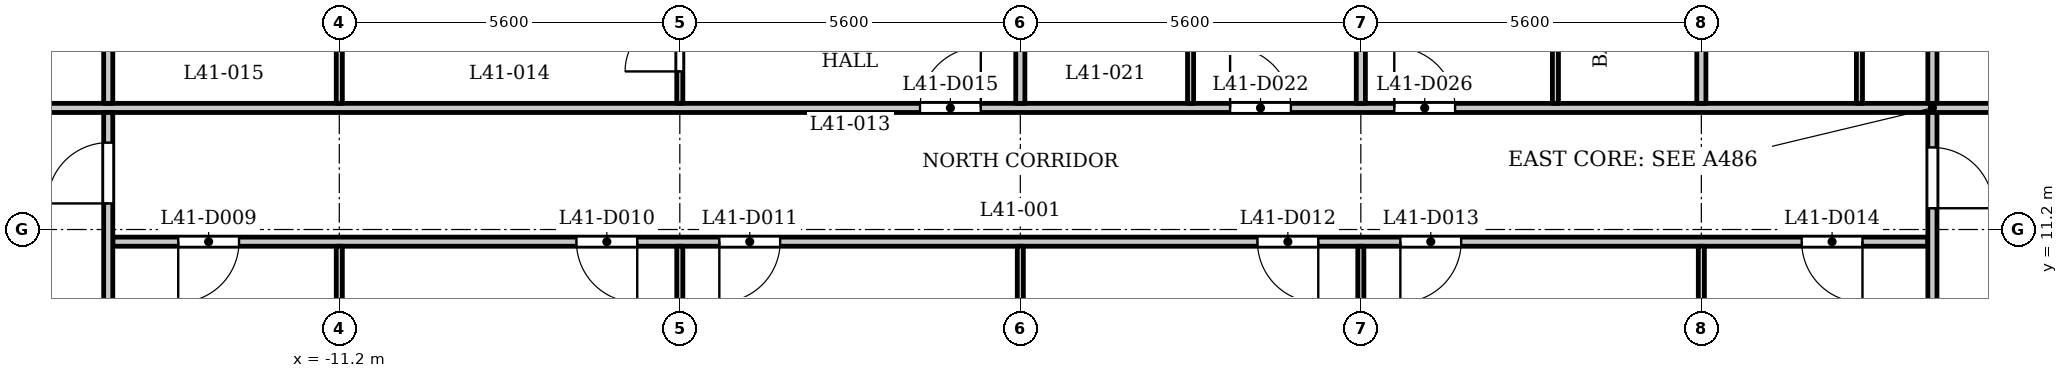
"""IFC4 building model, lengths in metres.
Left out: names, types, materials, properties, quantities, classifications, styles, units other than length and angle.
Written with IfcOpenShell. Run it as: python <this file> out.ifc"""

import sys

from ifc_helpers import new_model, si_unit, direction, frame, frame_2d, origin, place, context, subcontext, project, spatial, rectangle, extrude, element, fill, save


model = new_model("IFC4")
c1 = context("Model", 3, precision=1e-05, world=origin(), true_north=direction((0.0, 1.0)))
c2 = subcontext(c1, "Body", "Model", "MODEL_VIEW")
j1 = project(units=[si_unit("LENGTHUNIT", "METRE"), si_unit("PLANEANGLEUNIT", "RADIAN")], contexts=[c1])
p1 = place(None, origin())
s1 = spatial("IfcSite", under=j1, at=p1, CompositionType="ELEMENT")
p2 = place(p1, origin())
s2 = spatial("IfcBuilding", under=s1, at=p2, CompositionType="ELEMENT")
p3 = place(p2, frame((0.0, 0.0, 160.6)))
s3 = spatial("IfcBuildingStorey", under=s2, at=p3, CompositionType="ELEMENT", Elevation=160.6)
p4 = place(p3, frame((-14.925, 11.0, 0.0), z_axis=(0.0, 0.0, 1.0), x_axis=(1.0, 0.0, 0.0)))
e1 = element("IfcWall", 1, at=p4, inside=s3, PredefinedType="PARTITIONING", context=c2, shape_type="SweptSolid", body=[
    extrude(rectangle(XDim=29.85, YDim=0.15, at=frame_2d((14.925, 0.0))), origin(), (0.0, 0.0, 1.0), 3.2),
])
p5 = place(p4, frame((1.076, 0.0, 0.0)))
e2 = element("IfcOpeningElement", 2, at=p5, cuts=e1, PredefinedType="OPENING", context=c2, shape_type="SweptSolid", body=[
    extrude(rectangle(XDim=1.0, YDim=2.1, at=frame_2d((0.5, 1.05))), frame((0.0, 0.085, 0.0), z_axis=(0.0, -1.0, 0.0), x_axis=(1.0, 0.0, 0.0)), (0.0, 0.0, 1.0), 0.17),
])
p6 = place(p4, frame((7.625, 0.0, 0.0)))
e3 = element("IfcOpeningElement", 3, at=p6, cuts=e1, PredefinedType="OPENING", context=c2, shape_type="SweptSolid", body=[
    extrude(rectangle(XDim=1.0, YDim=2.1, at=frame_2d((0.5, 1.05))), frame((0.0, 0.085, 0.0), z_axis=(0.0, -1.0, 0.0), x_axis=(1.0, 0.0, 0.0)), (0.0, 0.0, 1.0), 0.17),
])
p7 = place(p4, frame((9.975, 0.0, 0.0)))
e4 = element("IfcOpeningElement", 4, at=p7, cuts=e1, PredefinedType="OPENING", context=c2, shape_type="SweptSolid", body=[
    extrude(rectangle(XDim=1.0, YDim=2.1, at=frame_2d((0.5, 1.05))), frame((0.0, 0.085, 0.0), z_axis=(0.0, -1.0, 0.0), x_axis=(1.0, 0.0, 0.0)), (0.0, 0.0, 1.0), 0.17),
])
p8 = place(p4, frame((18.825, 0.0, 0.0)))
e5 = element("IfcOpeningElement", 5, at=p8, cuts=e1, PredefinedType="OPENING", context=c2, shape_type="SweptSolid", body=[
    extrude(rectangle(XDim=1.0, YDim=2.1, at=frame_2d((0.5, 1.05))), frame((0.0, 0.085, 0.0), z_axis=(0.0, -1.0, 0.0), x_axis=(1.0, 0.0, 0.0)), (0.0, 0.0, 1.0), 0.17),
])
p9 = place(p4, frame((21.175, 0.0, 0.0)))
e6 = element("IfcOpeningElement", 6, at=p9, cuts=e1, PredefinedType="OPENING", context=c2, shape_type="SweptSolid", body=[
    extrude(rectangle(XDim=1.0, YDim=2.1, at=frame_2d((0.5, 1.05))), frame((0.0, 0.085, 0.0), z_axis=(0.0, -1.0, 0.0), x_axis=(1.0, 0.0, 0.0)), (0.0, 0.0, 1.0), 0.17),
])
p10 = place(p4, frame((27.775, 0.0, 0.0)))
e7 = element("IfcOpeningElement", 7, at=p10, cuts=e1, PredefinedType="OPENING", context=c2, shape_type="SweptSolid", body=[
    extrude(rectangle(XDim=1.0, YDim=2.1, at=frame_2d((0.5, 1.05))), frame((0.0, 0.085, 0.0), z_axis=(0.0, -1.0, 0.0), x_axis=(1.0, 0.0, 0.0)), (0.0, 0.0, 1.0), 0.17),
])
p11 = place(p3, frame((-17.4, 13.2, 0.0), z_axis=(0.0, 0.0, 1.0), x_axis=(1.0, 0.0, 0.0)))
e8 = element("IfcWall", 8, at=p11, inside=s3, PredefinedType="PARTITIONING", context=c2, shape_type="SweptSolid", body=[
    extrude(rectangle(XDim=34.8, YDim=0.15, at=frame_2d((17.4, 0.0))), origin(), (0.0, 0.0, 1.0), 3.2),
])
p12 = place(p11, frame((0.25, 0.0, 0.0)))
e9 = element("IfcOpeningElement", 9, at=p12, cuts=e8, PredefinedType="OPENING", context=c2, shape_type="SweptSolid", body=[
    extrude(rectangle(XDim=1.0, YDim=2.1, at=frame_2d((0.5, 1.05))), frame((0.0, 0.085, 0.0), z_axis=(0.0, -1.0, 0.0), x_axis=(1.0, 0.0, 0.0)), (0.0, 0.0, 1.0), 0.17),
])
p13 = place(p11, frame((33.65, 0.0, 0.0)))
e10 = element("IfcOpeningElement", 10, at=p13, cuts=e8, PredefinedType="OPENING", context=c2, shape_type="SweptSolid", body=[
    extrude(rectangle(XDim=1.0, YDim=2.1, at=frame_2d((0.5, 1.05))), frame((0.0, 0.085, 0.0), z_axis=(0.0, -1.0, 0.0), x_axis=(1.0, 0.0, 0.0)), (0.0, 0.0, 1.0), 0.17),
])
p14 = place(p11, frame((15.75, 0.0, 0.0)))
e11 = element("IfcOpeningElement", 11, at=p14, cuts=e8, PredefinedType="OPENING", context=c2, shape_type="SweptSolid", body=[
    extrude(rectangle(XDim=1.0, YDim=2.1, at=frame_2d((0.5, 1.05))), frame((0.0, 0.085, 0.0), z_axis=(0.0, -1.0, 0.0), x_axis=(1.0, 0.0, 0.0)), (0.0, 0.0, 1.0), 0.17),
])
p15 = place(p11, frame((20.85, 0.0, 0.0)))
e12 = element("IfcOpeningElement", 12, at=p15, cuts=e8, PredefinedType="OPENING", context=c2, shape_type="SweptSolid", body=[
    extrude(rectangle(XDim=1.0, YDim=2.1, at=frame_2d((0.5, 1.05))), frame((0.0, 0.085, 0.0), z_axis=(0.0, -1.0, 0.0), x_axis=(1.0, 0.0, 0.0)), (0.0, 0.0, 1.0), 0.17),
])
p16 = place(p11, frame((23.55, 0.0, 0.0)))
e13 = element("IfcOpeningElement", 13, at=p16, cuts=e8, PredefinedType="OPENING", context=c2, shape_type="SweptSolid", body=[
    extrude(rectangle(XDim=1.0, YDim=2.1, at=frame_2d((0.5, 1.05))), frame((0.0, 0.085, 0.0), z_axis=(0.0, -1.0, 0.0), x_axis=(1.0, 0.0, 0.0)), (0.0, 0.0, 1.0), 0.17),
])
p17 = place(p3, frame((-15.0, 6.769, 0.0), z_axis=(0.0, 0.0, 1.0), x_axis=(0.0, 1.0, 0.0)))
e14 = element("IfcWall", 14, at=p17, inside=s3, PredefinedType="PARTITIONING", context=c2, shape_type="SweptSolid", body=[
    extrude(rectangle(XDim=6.356, YDim=0.15, at=frame_2d((3.178, 0.0))), origin(), (0.0, 0.0, 1.0), 3.2),
])
p18 = place(p17, frame((4.86, 0.0, 0.0)))
e15 = element("IfcOpeningElement", 15, at=p18, cuts=e14, PredefinedType="OPENING", context=c2, shape_type="SweptSolid", body=[
    extrude(rectangle(XDim=1.0, YDim=2.1, at=frame_2d((0.5, 1.05))), frame((0.0, 0.085, 0.0), z_axis=(0.0, -1.0, 0.0), x_axis=(1.0, 0.0, 0.0)), (0.0, 0.0, 1.0), 0.17),
])
p19 = place(p3, frame((-15.0, 13.275, 0.0), z_axis=(0.0, 0.0, 1.0), x_axis=(0.0, 1.0, 0.0)))
e16 = element("IfcWall", 16, at=p19, inside=s3, PredefinedType="PARTITIONING", context=c2, shape_type="SweptSolid", body=[
    extrude(rectangle(XDim=2.05, YDim=0.15, at=frame_2d((1.025, 0.0))), origin(), (0.0, 0.0, 1.0), 3.2),
])
p20 = place(p3, frame((-11.2, 7.32, 0.0), z_axis=(0.0, 0.0, 1.0), x_axis=(0.0, 1.0, 0.0)))
e17 = element("IfcWall", 17, at=p20, inside=s3, PredefinedType="PARTITIONING", context=c2, shape_type="SweptSolid", body=[
    extrude(rectangle(XDim=3.605, YDim=0.1, at=frame_2d((1.802, 0.0))), origin(), (0.0, 0.0, 1.0), 3.2),
])
p21 = place(p3, frame((-11.2, 13.275, 0.0), z_axis=(0.0, 0.0, 1.0), x_axis=(0.0, 1.0, 0.0)))
e18 = element("IfcWall", 18, at=p21, inside=s3, PredefinedType="PARTITIONING", context=c2, shape_type="SweptSolid", body=[
    extrude(rectangle(XDim=3.775, YDim=0.1, at=frame_2d((1.888, 0.0))), origin(), (0.0, 0.0, 1.0), 3.2),
])
p22 = place(p21, frame((2.875, 0.0, 0.0)))
e19 = element("IfcOpeningElement", 19, at=p22, cuts=e18, PredefinedType="OPENING", context=c2, shape_type="SweptSolid", body=[
    extrude(rectangle(XDim=0.8, YDim=2.1, at=frame_2d((0.4, 1.05))), frame((0.0, 0.06, 0.0), z_axis=(0.0, -1.0, 0.0), x_axis=(1.0, 0.0, 0.0)), (0.0, 0.0, 1.0), 0.12),
])
p23 = place(p3, frame((-5.6, 7.32, 0.0), z_axis=(0.0, 0.0, 1.0), x_axis=(0.0, 1.0, 0.0)))
e20 = element("IfcWall", 20, at=p23, inside=s3, PredefinedType="PARTITIONING", context=c2, shape_type="SweptSolid", body=[
    extrude(rectangle(XDim=3.605, YDim=0.1, at=frame_2d((1.802, 0.0))), origin(), (0.0, 0.0, 1.0), 3.2),
])
p24 = place(p3, frame((-5.6, 13.275, 0.0), z_axis=(0.0, 0.0, 1.0), x_axis=(0.0, 1.0, 0.0)))
e21 = element("IfcWall", 21, at=p24, inside=s3, PredefinedType="PARTITIONING", context=c2, shape_type="SweptSolid", body=[
    extrude(rectangle(XDim=3.775, YDim=0.1, at=frame_2d((1.888, 0.0))), origin(), (0.0, 0.0, 1.0), 3.2),
])
p25 = place(p24, frame((0.525, 0.0, 0.0)))
e22 = element("IfcOpeningElement", 22, at=p25, cuts=e21, PredefinedType="OPENING", context=c2, shape_type="SweptSolid", body=[
    extrude(rectangle(XDim=0.9, YDim=2.1, at=frame_2d((0.45, 1.05))), frame((0.0, 0.06, 0.0), z_axis=(0.0, -1.0, 0.0), x_axis=(1.0, 0.0, 0.0)), (0.0, 0.0, 1.0), 0.12),
])
p26 = place(p3, frame((0.0, 7.32, 0.0), z_axis=(0.0, 0.0, 1.0), x_axis=(0.0, 1.0, 0.0)))
e23 = element("IfcWall", 23, at=p26, inside=s3, PredefinedType="PARTITIONING", context=c2, shape_type="SweptSolid", body=[
    extrude(rectangle(XDim=3.605, YDim=0.1, at=frame_2d((1.802, 0.0))), origin(), (0.0, 0.0, 1.0), 3.2),
])
p27 = place(p3, frame((0.0, 13.275, 0.0), z_axis=(0.0, 0.0, 1.0), x_axis=(0.0, 1.0, 0.0)))
e24 = element("IfcWall", 24, at=p27, inside=s3, PredefinedType="PARTITIONING", context=c2, shape_type="SweptSolid", body=[
    extrude(rectangle(XDim=3.775, YDim=0.15, at=frame_2d((1.888, 0.0))), origin(), (0.0, 0.0, 1.0), 3.2),
])
p28 = place(p3, frame((2.8, 13.275, 0.0), z_axis=(0.0, 0.0, 1.0), x_axis=(0.0, 1.0, 0.0)))
e25 = element("IfcWall", 25, at=p28, inside=s3, PredefinedType="PARTITIONING", context=c2, shape_type="SweptSolid", body=[
    extrude(rectangle(XDim=3.775, YDim=0.1, at=frame_2d((1.888, 0.0))), origin(), (0.0, 0.0, 1.0), 3.2),
])
p29 = place(p3, frame((5.6, 7.32, 0.0), z_axis=(0.0, 0.0, 1.0), x_axis=(0.0, 1.0, 0.0)))
e26 = element("IfcWall", 26, at=p29, inside=s3, PredefinedType="PARTITIONING", context=c2, shape_type="SweptSolid", body=[
    extrude(rectangle(XDim=3.605, YDim=0.1, at=frame_2d((1.802, 0.0))), origin(), (0.0, 0.0, 1.0), 3.2),
])
p30 = place(p3, frame((5.6, 13.275, 0.0), z_axis=(0.0, 0.0, 1.0), x_axis=(0.0, 1.0, 0.0)))
e27 = element("IfcWall", 27, at=p30, inside=s3, PredefinedType="PARTITIONING", context=c2, shape_type="SweptSolid", body=[
    extrude(rectangle(XDim=3.775, YDim=0.15, at=frame_2d((1.888, 0.0))), origin(), (0.0, 0.0, 1.0), 3.2),
])
p31 = place(p3, frame((8.8, 13.275, 0.0), z_axis=(0.0, 0.0, 1.0), x_axis=(0.0, 1.0, 0.0)))
e28 = element("IfcWall", 28, at=p31, inside=s3, PredefinedType="PARTITIONING", context=c2, shape_type="SweptSolid", body=[
    extrude(rectangle(XDim=3.775, YDim=0.1, at=frame_2d((1.888, 0.0))), origin(), (0.0, 0.0, 1.0), 3.2),
])
p32 = place(p3, frame((11.2, 7.32, 0.0), z_axis=(0.0, 0.0, 1.0), x_axis=(0.0, 1.0, 0.0)))
e29 = element("IfcWall", 29, at=p32, inside=s3, PredefinedType="PARTITIONING", context=c2, shape_type="SweptSolid", body=[
    extrude(rectangle(XDim=3.605, YDim=0.1, at=frame_2d((1.802, 0.0))), origin(), (0.0, 0.0, 1.0), 3.2),
])
p33 = place(p3, frame((11.2, 13.275, 0.0), z_axis=(0.0, 0.0, 1.0), x_axis=(0.0, 1.0, 0.0)))
e30 = element("IfcWall", 30, at=p33, inside=s3, PredefinedType="PARTITIONING", context=c2, shape_type="SweptSolid", body=[
    extrude(rectangle(XDim=3.775, YDim=0.15, at=frame_2d((1.888, 0.0))), origin(), (0.0, 0.0, 1.0), 3.2),
])
p34 = place(p3, frame((13.8, 13.275, 0.0), z_axis=(0.0, 0.0, 1.0), x_axis=(0.0, 1.0, 0.0)))
e31 = element("IfcWall", 31, at=p34, inside=s3, PredefinedType="PARTITIONING", context=c2, shape_type="SweptSolid", body=[
    extrude(rectangle(XDim=3.775, YDim=0.1, at=frame_2d((1.888, 0.0))), origin(), (0.0, 0.0, 1.0), 3.2),
])
p35 = place(p3, frame((15.0, 6.769, 0.0), z_axis=(0.0, 0.0, 1.0), x_axis=(0.0, 1.0, 0.0)))
e32 = element("IfcWall", 32, at=p35, inside=s3, PredefinedType="PARTITIONING", context=c2, shape_type="SweptSolid", body=[
    extrude(rectangle(XDim=6.356, YDim=0.15, at=frame_2d((3.178, 0.0))), origin(), (0.0, 0.0, 1.0), 3.2),
])
p36 = place(p35, frame((4.781, 0.0, 0.0)))
e33 = element("IfcOpeningElement", 33, at=p36, cuts=e32, PredefinedType="OPENING", context=c2, shape_type="SweptSolid", body=[
    extrude(rectangle(XDim=1.0, YDim=2.1, at=frame_2d((0.5, 1.05))), frame((0.0, 0.085, 0.0), z_axis=(0.0, -1.0, 0.0), x_axis=(1.0, 0.0, 0.0)), (0.0, 0.0, 1.0), 0.17),
])
p37 = place(p3, frame((15.0, 13.275, 0.0), z_axis=(0.0, 0.0, 1.0), x_axis=(0.0, 1.0, 0.0)))
e34 = element("IfcWall", 34, at=p37, inside=s3, PredefinedType="PARTITIONING", context=c2, shape_type="SweptSolid", body=[
    extrude(rectangle(XDim=2.05, YDim=0.15, at=frame_2d((1.025, 0.0))), origin(), (0.0, 0.0, 1.0), 3.2),
])
p38 = place(p18, origin())
e35 = element("IfcDoor", 35, at=p38, inside=s3, OperationType="SINGLE_SWING_RIGHT", PredefinedType="DOOR", context=c2, shape_type="SweptSolid", body=[
    extrude(rectangle(XDim=1.0, YDim=2.1, at=frame_2d((0.5, 1.05))), frame((0.0, 0.025, 0.0), z_axis=(0.0, -1.0, 0.0), x_axis=(1.0, 0.0, 0.0)), (0.0, 0.0, 1.0), 0.05),
])
fill(e15, e35)
p39 = place(p36, origin())
e36 = element("IfcDoor", 36, at=p39, inside=s3, OperationType="SINGLE_SWING_LEFT", PredefinedType="DOOR", context=c2, shape_type="SweptSolid", body=[
    extrude(rectangle(XDim=1.0, YDim=2.1, at=frame_2d((0.5, 1.05))), frame((0.0, 0.025, 0.0), z_axis=(0.0, -1.0, 0.0), x_axis=(1.0, 0.0, 0.0)), (0.0, 0.0, 1.0), 0.05),
])
fill(e33, e36)
p40 = place(p5, origin())
e37 = element("IfcDoor", 37, at=p40, inside=s3, OperationType="SINGLE_SWING_LEFT", PredefinedType="DOOR", context=c2, shape_type="SweptSolid", body=[
    extrude(rectangle(XDim=1.0, YDim=2.1, at=frame_2d((0.5, 1.05))), frame((0.0, 0.025, 0.0), z_axis=(0.0, -1.0, 0.0), x_axis=(1.0, 0.0, 0.0)), (0.0, 0.0, 1.0), 0.05),
])
fill(e2, e37)
p41 = place(p6, origin())
e38 = element("IfcDoor", 38, at=p41, inside=s3, OperationType="SINGLE_SWING_RIGHT", PredefinedType="DOOR", context=c2, shape_type="SweptSolid", body=[
    extrude(rectangle(XDim=1.0, YDim=2.1, at=frame_2d((0.5, 1.05))), frame((0.0, 0.025, 0.0), z_axis=(0.0, -1.0, 0.0), x_axis=(1.0, 0.0, 0.0)), (0.0, 0.0, 1.0), 0.05),
])
fill(e3, e38)
p42 = place(p7, origin())
e39 = element("IfcDoor", 39, at=p42, inside=s3, OperationType="SINGLE_SWING_LEFT", PredefinedType="DOOR", context=c2, shape_type="SweptSolid", body=[
    extrude(rectangle(XDim=1.0, YDim=2.1, at=frame_2d((0.5, 1.05))), frame((0.0, 0.025, 0.0), z_axis=(0.0, -1.0, 0.0), x_axis=(1.0, 0.0, 0.0)), (0.0, 0.0, 1.0), 0.05),
])
fill(e4, e39)
p43 = place(p8, origin())
e40 = element("IfcDoor", 40, at=p43, inside=s3, OperationType="SINGLE_SWING_RIGHT", PredefinedType="DOOR", context=c2, shape_type="SweptSolid", body=[
    extrude(rectangle(XDim=1.0, YDim=2.1, at=frame_2d((0.5, 1.05))), frame((0.0, 0.025, 0.0), z_axis=(0.0, -1.0, 0.0), x_axis=(1.0, 0.0, 0.0)), (0.0, 0.0, 1.0), 0.05),
])
fill(e5, e40)
p44 = place(p9, origin())
e41 = element("IfcDoor", 41, at=p44, inside=s3, OperationType="SINGLE_SWING_LEFT", PredefinedType="DOOR", context=c2, shape_type="SweptSolid", body=[
    extrude(rectangle(XDim=1.0, YDim=2.1, at=frame_2d((0.5, 1.05))), frame((0.0, 0.025, 0.0), z_axis=(0.0, -1.0, 0.0), x_axis=(1.0, 0.0, 0.0)), (0.0, 0.0, 1.0), 0.05),
])
fill(e6, e41)
p45 = place(p10, origin())
e42 = element("IfcDoor", 42, at=p45, inside=s3, OperationType="SINGLE_SWING_RIGHT", PredefinedType="DOOR", context=c2, shape_type="SweptSolid", body=[
    extrude(rectangle(XDim=1.0, YDim=2.1, at=frame_2d((0.5, 1.05))), frame((0.0, 0.025, 0.0), z_axis=(0.0, -1.0, 0.0), x_axis=(1.0, 0.0, 0.0)), (0.0, 0.0, 1.0), 0.05),
])
fill(e7, e42)
p46 = place(p14, origin())
e43 = element("IfcDoor", 43, at=p46, inside=s3, OperationType="SINGLE_SWING_LEFT", PredefinedType="DOOR", context=c2, shape_type="SweptSolid", body=[
    extrude(rectangle(XDim=1.0, YDim=2.1, at=frame_2d((0.5, 1.05))), frame((0.0, 0.025, 0.0), z_axis=(0.0, -1.0, 0.0), x_axis=(1.0, 0.0, 0.0)), (0.0, 0.0, 1.0), 0.05),
])
fill(e11, e43)
p47 = place(p25, origin())
e44 = element("IfcDoor", 44, at=p47, inside=s3, OperationType="SINGLE_SWING_RIGHT", PredefinedType="DOOR", context=c2, shape_type="SweptSolid", body=[
    extrude(rectangle(XDim=0.9, YDim=2.1, at=frame_2d((0.45, 1.05))), frame((0.0, 0.025, 0.0), z_axis=(0.0, -1.0, 0.0), x_axis=(1.0, 0.0, 0.0)), (0.0, 0.0, 1.0), 0.05),
])
fill(e22, e44)
p48 = place(p15, origin())
e45 = element("IfcDoor", 45, at=p48, inside=s3, OperationType="SINGLE_SWING_RIGHT", PredefinedType="DOOR", context=c2, shape_type="SweptSolid", body=[
    extrude(rectangle(XDim=1.0, YDim=2.1, at=frame_2d((0.5, 1.05))), frame((0.0, 0.025, 0.0), z_axis=(0.0, -1.0, 0.0), x_axis=(1.0, 0.0, 0.0)), (0.0, 0.0, 1.0), 0.05),
])
fill(e12, e45)
p49 = place(p16, origin())
e46 = element("IfcDoor", 46, at=p49, inside=s3, OperationType="SINGLE_SWING_RIGHT", PredefinedType="DOOR", context=c2, shape_type="SweptSolid", body=[
    extrude(rectangle(XDim=1.0, YDim=2.1, at=frame_2d((0.5, 1.05))), frame((0.0, 0.025, 0.0), z_axis=(0.0, -1.0, 0.0), x_axis=(1.0, 0.0, 0.0)), (0.0, 0.0, 1.0), 0.05),
])
fill(e13, e46)
save(model, sys.argv[1])
